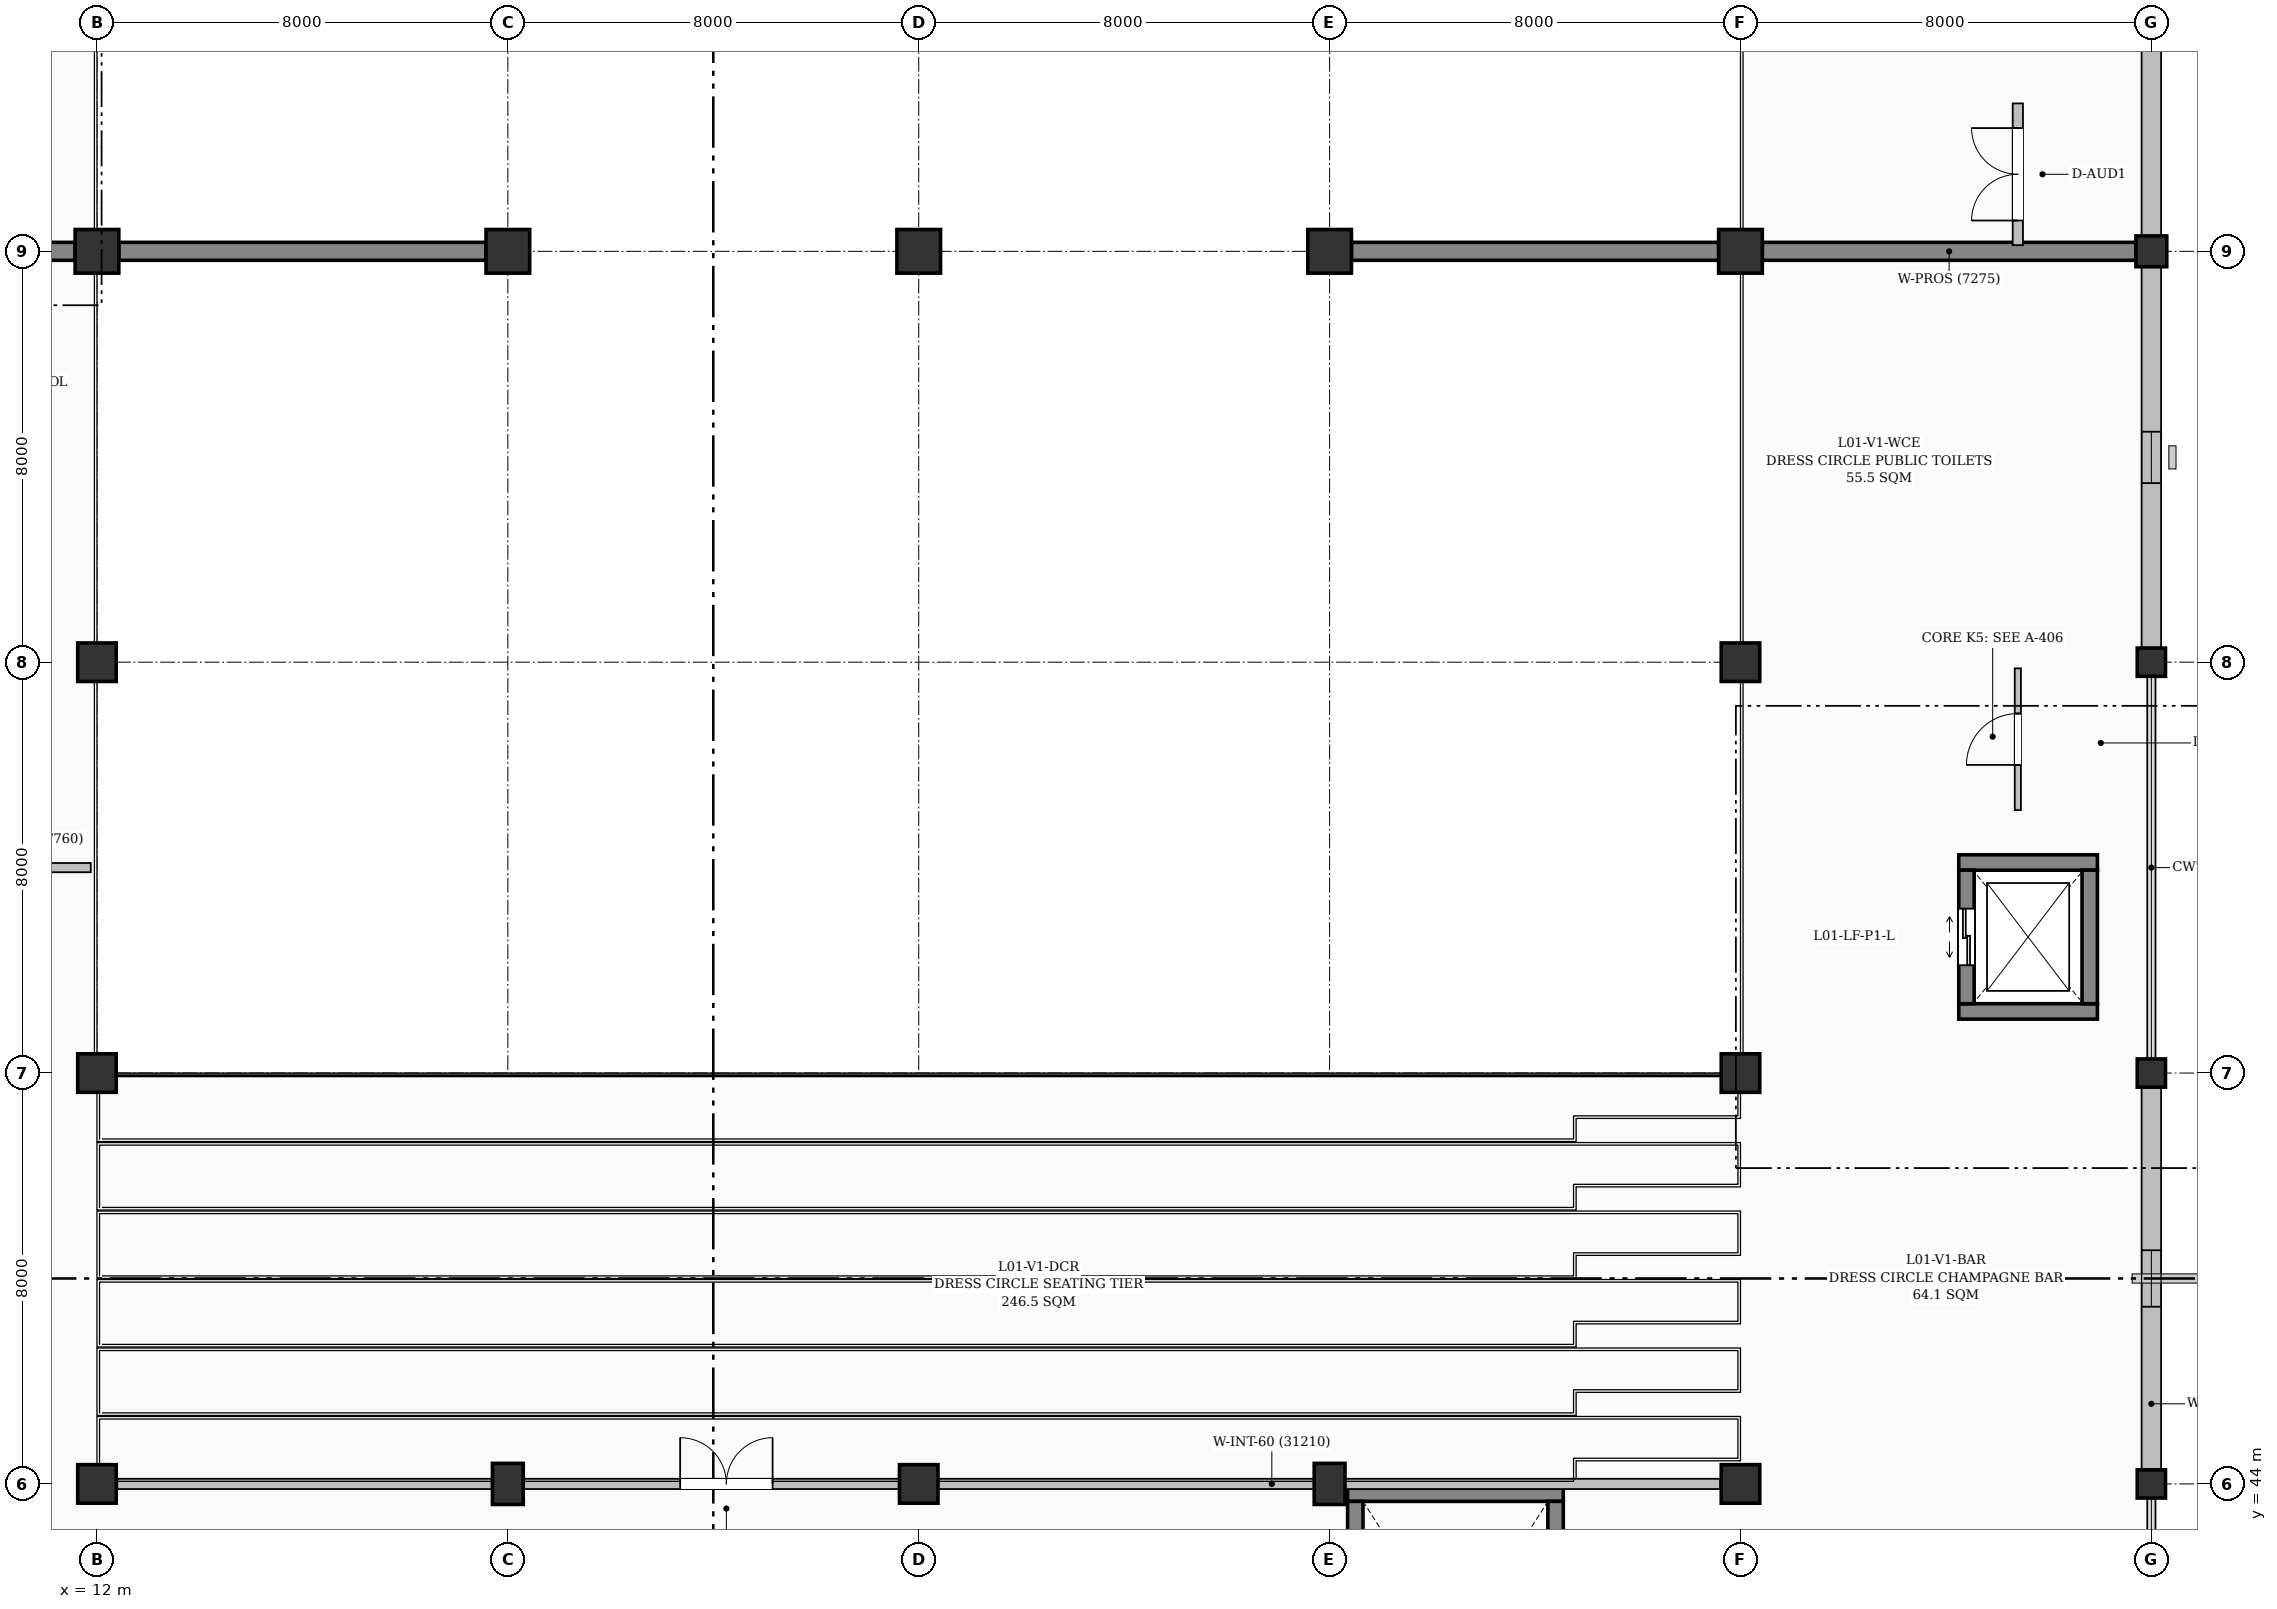
"""IFC4 building model, lengths in metres.
Left out: names, types, materials, properties, quantities, classifications, styles, units other than length and angle.
Written with IfcOpenShell. Run it as: python <this file> out.ifc"""

import sys

from ifc_helpers import new_model, si_unit, direction, frame, frame_2d, origin, origin_2d, place, context, subcontext, project, spatial, rectangle, extrude, element, fill, save


model = new_model("IFC4")
c1 = context("Model", 3, precision=1e-05, world=origin(), true_north=direction((0.0, 1.0)))
c2 = subcontext(c1, "Body", "Model", "MODEL_VIEW")
j1 = project(units=[si_unit("LENGTHUNIT", "METRE"), si_unit("PLANEANGLEUNIT", "RADIAN")], contexts=[c1])
p1 = place(None, origin())
s1 = spatial("IfcSite", under=j1, at=p1, CompositionType="ELEMENT")
p2 = place(p1, origin())
s2 = spatial("IfcBuilding", under=s1, at=p2, CompositionType="ELEMENT")
p3 = place(p2, frame((0.0, 0.0, 4.8)))
s3 = spatial("IfcBuildingStorey", under=s2, at=p3, CompositionType="ELEMENT", Elevation=4.8)
for number, where, z_axis, x_axis in (
    (1, (12.0, 44.0, 0.0), (0.0, 0.0, 1.0), (1.0, 0.0, 0.0)),
    (2, (12.0, 52.0, 0.0), (0.0, 0.0, 1.0), (1.0, 0.0, 0.0)),
    (3, (12.0, 60.0, 0.0), (0.0, 0.0, 1.0), (1.0, 0.0, 0.0)),
):
    element("IfcColumn", number, at=place(p3, frame(where, z_axis=z_axis, x_axis=x_axis)), inside=s3, PredefinedType="COLUMN", context=c2, shape_type="SweptSolid", body=[
        extrude(rectangle(XDim=0.75, YDim=0.75, at=origin_2d()), origin(), (0.0, 0.0, 1.0), 4.5),
    ])
p4 = place(p3, frame((12.0, 68.0, 0.0), z_axis=(0.0, 0.0, 1.0), x_axis=(1.0, 0.0, 0.0)))
e4 = element("IfcColumn", 4, at=p4, inside=s3, PredefinedType="COLUMN", context=c2, shape_type="SweptSolid", body=[
    extrude(rectangle(XDim=0.85, YDim=0.85, at=origin_2d()), origin(), (0.0, 0.0, 1.0), 4.5),
])
p5 = place(p3, frame((20.0, 44.0, 0.0), z_axis=(0.0, 0.0, 1.0), x_axis=(1.0, 0.0, 0.0)))
e5 = element("IfcColumn", 5, at=p5, inside=s3, PredefinedType="COLUMN", context=c2, shape_type="SweptSolid", body=[
    extrude(rectangle(XDim=0.6, YDim=0.8, at=origin_2d()), origin(), (0.0, 0.0, 1.0), 4.5),
])
p6 = place(p3, frame((20.0, 68.0, 0.0), z_axis=(0.0, 0.0, 1.0), x_axis=(1.0, 0.0, 0.0)))
e6 = element("IfcColumn", 6, at=p6, inside=s3, PredefinedType="COLUMN", context=c2, shape_type="SweptSolid", body=[
    extrude(rectangle(XDim=0.85, YDim=0.85, at=origin_2d()), origin(), (0.0, 0.0, 1.0), 4.5),
])
p7 = place(p3, frame((28.0, 44.0, 0.0), z_axis=(0.0, 0.0, 1.0), x_axis=(1.0, 0.0, 0.0)))
e7 = element("IfcColumn", 7, at=p7, inside=s3, PredefinedType="COLUMN", context=c2, shape_type="SweptSolid", body=[
    extrude(rectangle(XDim=0.75, YDim=0.75, at=origin_2d()), origin(), (0.0, 0.0, 1.0), 4.5),
])
p8 = place(p3, frame((28.0, 68.0, 0.0), z_axis=(0.0, 0.0, 1.0), x_axis=(1.0, 0.0, 0.0)))
e8 = element("IfcColumn", 8, at=p8, inside=s3, PredefinedType="COLUMN", context=c2, shape_type="SweptSolid", body=[
    extrude(rectangle(XDim=0.85, YDim=0.85, at=origin_2d()), origin(), (0.0, 0.0, 1.0), 4.5),
])
p9 = place(p3, frame((36.0, 44.0, 0.0), z_axis=(0.0, 0.0, 1.0), x_axis=(1.0, 0.0, 0.0)))
e9 = element("IfcColumn", 9, at=p9, inside=s3, PredefinedType="COLUMN", context=c2, shape_type="SweptSolid", body=[
    extrude(rectangle(XDim=0.6, YDim=0.8, at=origin_2d()), origin(), (0.0, 0.0, 1.0), 4.5),
])
p10 = place(p3, frame((36.0, 68.0, 0.0), z_axis=(0.0, 0.0, 1.0), x_axis=(1.0, 0.0, 0.0)))
e10 = element("IfcColumn", 10, at=p10, inside=s3, PredefinedType="COLUMN", context=c2, shape_type="SweptSolid", body=[
    extrude(rectangle(XDim=0.85, YDim=0.85, at=origin_2d()), origin(), (0.0, 0.0, 1.0), 4.5),
])
for number, where, z_axis, x_axis in (
    (11, (44.0, 44.0, 0.0), (0.0, 0.0, 1.0), (1.0, 0.0, 0.0)),
    (12, (44.0, 52.0, 0.0), (0.0, 0.0, 1.0), (1.0, 0.0, 0.0)),
    (13, (44.0, 60.0, 0.0), (0.0, 0.0, 1.0), (1.0, 0.0, 0.0)),
):
    element("IfcColumn", number, at=place(p3, frame(where, z_axis=z_axis, x_axis=x_axis)), inside=s3, PredefinedType="COLUMN", context=c2, shape_type="SweptSolid", body=[
        extrude(rectangle(XDim=0.75, YDim=0.75, at=origin_2d()), origin(), (0.0, 0.0, 1.0), 4.5),
    ])
p11 = place(p3, frame((44.0, 68.0, 0.0), z_axis=(0.0, 0.0, 1.0), x_axis=(1.0, 0.0, 0.0)))
e14 = element("IfcColumn", 14, at=p11, inside=s3, PredefinedType="COLUMN", context=c2, shape_type="SweptSolid", body=[
    extrude(rectangle(XDim=0.85, YDim=0.85, at=origin_2d()), origin(), (0.0, 0.0, 1.0), 4.5),
])
for number, where, z_axis, x_axis in (
    (15, (52.0, 44.0, 0.0), (0.0, 0.0, 1.0), (1.0, 0.0, 0.0)),
    (16, (52.0, 52.0, 0.0), (0.0, 0.0, 1.0), (1.0, 0.0, 0.0)),
    (17, (52.0, 60.0, 0.0), (0.0, 0.0, 1.0), (1.0, 0.0, 0.0)),
):
    element("IfcColumn", number, at=place(p3, frame(where, z_axis=z_axis, x_axis=x_axis)), inside=s3, PredefinedType="COLUMN", context=c2, shape_type="SweptSolid", body=[
        extrude(rectangle(XDim=0.55, YDim=0.55, at=origin_2d()), origin(), (0.0, 0.0, 1.0), 4.5),
    ])
p12 = place(p3, frame((52.0, 68.0, 0.0), z_axis=(0.0, 0.0, 1.0), x_axis=(1.0, 0.0, 0.0)))
e18 = element("IfcColumn", 18, at=p12, inside=s3, PredefinedType="COLUMN", context=c2, shape_type="SweptSolid", body=[
    extrude(rectangle(XDim=0.6, YDim=0.6, at=origin_2d()), origin(), (0.0, 0.0, 1.0), 4.5),
])
p13 = place(p3, frame((4.3, 68.0, 0.0), z_axis=(0.0, 0.0, 1.0), x_axis=(1.0, 0.0, 0.0)))
e19 = element("IfcWall", 19, at=p13, inside=s3, PredefinedType="SHEAR", context=c2, shape_type="SweptSolid", body=[
    extrude(rectangle(XDim=7.275, YDim=0.35, at=frame_2d((3.637, 0.0))), origin(), (0.0, 0.0, 1.0), 4.25),
])
for number, where, z_axis, x_axis in (
    (20, (12.425, 68.0, 0.0), (0.0, 0.0, 1.0), (1.0, 0.0, 0.0)),
    (21, (36.425, 68.0, 0.0), (0.0, 0.0, 1.0), (1.0, 0.0, 0.0)),
):
    element("IfcWall", number, at=place(p3, frame(where, z_axis=z_axis, x_axis=x_axis)), inside=s3, PredefinedType="SHEAR", context=c2, shape_type="SweptSolid", body=[
        extrude(rectangle(XDim=7.15, YDim=0.35, at=frame_2d((3.575, 0.0))), origin(), (0.0, 0.0, 1.0), 4.25),
    ])
p14 = place(p3, frame((44.425, 68.0, 0.0), z_axis=(0.0, 0.0, 1.0), x_axis=(1.0, 0.0, 0.0)))
e22 = element("IfcWall", 22, at=p14, inside=s3, PredefinedType="SHEAR", context=c2, shape_type="SweptSolid", body=[
    extrude(rectangle(XDim=7.275, YDim=0.35, at=frame_2d((3.637, 0.0))), origin(), (0.0, 0.0, 1.0), 4.25),
])
p15 = place(p3, frame((52.0, 67.7, 0.0), z_axis=(0.0, 0.0, 1.0), x_axis=(0.0, -1.0, 0.0)))
e23 = element("IfcWall", 23, at=p15, inside=s3, PredefinedType="SOLIDWALL", context=c2, shape_type="SweptSolid", body=[
    extrude(rectangle(XDim=7.425, YDim=0.38, at=frame_2d((3.712, 0.0))), origin(), (0.0, 0.0, 1.0), 4.25),
])
p16 = place(p15, frame((3.212, 0.0, 0.95)))
e24 = element("IfcOpeningElement", 24, at=p16, cuts=e23, PredefinedType="OPENING", context=c2, shape_type="SweptSolid", body=[
    extrude(rectangle(XDim=1.0, YDim=1.4, at=frame_2d((0.5, 0.7))), frame((0.0, 0.2, 0.0), z_axis=(0.0, -1.0, 0.0), x_axis=(1.0, 0.0, 0.0)), (0.0, 0.0, 1.0), 0.4),
])
p17 = place(p3, frame((52.0, 51.725, 0.0), z_axis=(0.0, 0.0, 1.0), x_axis=(0.0, -1.0, 0.0)))
e25 = element("IfcWall", 25, at=p17, inside=s3, PredefinedType="SOLIDWALL", context=c2, shape_type="SweptSolid", body=[
    extrude(rectangle(XDim=7.45, YDim=0.38, at=frame_2d((3.725, 0.0))), origin(), (0.0, 0.0, 1.0), 4.25),
])
p18 = place(p17, frame((3.175, 0.0, 0.95)))
e26 = element("IfcOpeningElement", 26, at=p18, cuts=e25, PredefinedType="OPENING", context=c2, shape_type="SweptSolid", body=[
    extrude(rectangle(XDim=1.1, YDim=2.0, at=frame_2d((0.55, 1.0))), frame((0.0, 0.2, 0.0), z_axis=(0.0, -1.0, 0.0), x_axis=(1.0, 0.0, 0.0)), (0.0, 0.0, 1.0), 0.4),
])
p19 = place(p3, frame((52.0, 75.7, 0.0), z_axis=(0.0, 0.0, 1.0), x_axis=(0.0, -1.0, 0.0)))
e27 = element("IfcWall", 27, at=p19, inside=s3, PredefinedType="SOLIDWALL", context=c2, shape_type="SweptSolid", body=[
    extrude(rectangle(XDim=7.4, YDim=0.38, at=frame_2d((3.7, 0.0))), origin(), (0.0, 0.0, 1.0), 4.035),
])
p20 = place(p3, frame((40.55, 43.81, 0.0), z_axis=(0.0, 0.0, 1.0), x_axis=(-1.0, 0.0, 0.0)))
e28 = element("IfcWall", 28, at=p20, inside=s3, PredefinedType="SHEAR", context=c2, shape_type="SweptSolid", body=[
    extrude(rectangle(XDim=4.2, YDim=0.3, at=frame_2d((2.1, 0.0))), origin(), (0.0, 0.0, 1.0), 4.25),
])
p21 = place(p3, frame((36.5, 36.34, 0.0), z_axis=(0.0, 0.0, 1.0), x_axis=(0.0, 1.0, 0.0)))
e29 = element("IfcWall", 29, at=p21, inside=s3, PredefinedType="SHEAR", context=c2, shape_type="SweptSolid", body=[
    extrude(rectangle(XDim=7.32, YDim=0.3, at=frame_2d((3.66, 0.0))), origin(), (0.0, 0.0, 1.0), 4.25),
])
p22 = place(p3, frame((40.4, 36.34, 0.0), z_axis=(0.0, 0.0, 1.0), x_axis=(0.0, 1.0, 0.0)))
e30 = element("IfcWall", 30, at=p22, inside=s3, PredefinedType="SHEAR", context=c2, shape_type="SweptSolid", body=[
    extrude(rectangle(XDim=7.32, YDim=0.3, at=frame_2d((3.66, 0.0))), origin(), (0.0, 0.0, 1.0), 4.25),
])
p23 = place(p22, frame((0.35, 0.0, 0.0)))
e31 = element("IfcOpeningElement", 31, at=p23, cuts=e30, PredefinedType="OPENING", context=c2, shape_type="SweptSolid", body=[
    extrude(rectangle(XDim=1.2, YDim=2.15, at=frame_2d((0.6, 1.075))), frame((0.0, 0.16, 0.0), z_axis=(0.0, -1.0, 0.0), x_axis=(1.0, 0.0, 0.0)), (0.0, 0.0, 1.0), 0.32),
])
for number, where, z_axis, x_axis in (
    (32, (48.25, 53.2, 0.0), (0.0, 0.0, 1.0), (1.0, 0.0, 0.0)),
    (33, (50.95, 56.1, 0.0), (0.0, 0.0, 1.0), (-1.0, 0.0, 0.0)),
):
    element("IfcWall", number, at=place(p3, frame(where, z_axis=z_axis, x_axis=x_axis)), inside=s3, PredefinedType="SHEAR", context=c2, shape_type="SweptSolid", body=[
        extrude(rectangle(XDim=2.7, YDim=0.3, at=frame_2d((1.35, 0.0))), origin(), (0.0, 0.0, 1.0), 4.25),
    ])
p24 = place(p3, frame((48.4, 53.35, 0.0), z_axis=(0.0, 0.0, 1.0), x_axis=(0.0, 1.0, 0.0)))
e34 = element("IfcWall", 34, at=p24, inside=s3, PredefinedType="SHEAR", context=c2, shape_type="SweptSolid", body=[
    extrude(rectangle(XDim=2.6, YDim=0.3, at=frame_2d((1.3, 0.0))), origin(), (0.0, 0.0, 1.0), 4.25),
])
p25 = place(p24, frame((0.75, 0.0, 0.0)))
e35 = element("IfcOpeningElement", 35, at=p25, cuts=e34, PredefinedType="OPENING", context=c2, shape_type="SweptSolid", body=[
    extrude(rectangle(XDim=1.1, YDim=2.15, at=frame_2d((0.55, 1.075))), frame((0.0, 0.16, 0.0), z_axis=(0.0, -1.0, 0.0), x_axis=(1.0, 0.0, 0.0)), (0.0, 0.0, 1.0), 0.32),
])
p26 = place(p3, frame((50.8, 55.95, 0.0), z_axis=(0.0, 0.0, 1.0), x_axis=(0.0, -1.0, 0.0)))
e36 = element("IfcWall", 36, at=p26, inside=s3, PredefinedType="SHEAR", context=c2, shape_type="SweptSolid", body=[
    extrude(rectangle(XDim=2.6, YDim=0.3, at=frame_2d((1.3, 0.0))), origin(), (0.0, 0.0, 1.0), 4.25),
])
p27 = place(p3, frame((12.395, 44.0, 0.0), z_axis=(0.0, 0.0, 1.0), x_axis=(1.0, 0.0, 0.0)))
e37 = element("IfcWall", 37, at=p27, inside=s3, PredefinedType="PARTITIONING", context=c2, shape_type="SweptSolid", body=[
    extrude(rectangle(XDim=31.21, YDim=0.2, at=frame_2d((15.605, 0.0))), origin(), (0.0, 0.0, 1.0), 3.385),
])
p28 = place(p27, frame((10.96, 0.0, 0.0)))
e38 = element("IfcOpeningElement", 38, at=p28, cuts=e37, PredefinedType="OPENING", context=c2, shape_type="SweptSolid", body=[
    extrude(rectangle(XDim=1.8, YDim=2.35, at=frame_2d((0.9, 1.175))), frame((0.0, 0.11, 0.0), z_axis=(0.0, -1.0, 0.0), x_axis=(1.0, 0.0, 0.0)), (0.0, 0.0, 1.0), 0.22),
])
p29 = place(p3, frame((4.12, 56.0, 0.0), z_axis=(0.0, 0.0, 1.0), x_axis=(1.0, 0.0, 0.0)))
e39 = element("IfcWall", 39, at=p29, inside=s3, PredefinedType="PARTITIONING", context=c2, shape_type="SweptSolid", body=[
    extrude(rectangle(XDim=7.76, YDim=0.18, at=frame_2d((3.88, 0.0))), origin(), (0.0, 0.0, 1.0), 4.25),
])
p30 = place(p29, frame((3.205, 0.0, 0.0)))
e40 = element("IfcOpeningElement", 40, at=p30, cuts=e39, PredefinedType="OPENING", context=c2, shape_type="SweptSolid", body=[
    extrude(rectangle(XDim=1.35, YDim=2.2, at=frame_2d((0.675, 1.1))), frame((0.0, 0.1, 0.0), z_axis=(0.0, -1.0, 0.0), x_axis=(1.0, 0.0, 0.0)), (0.0, 0.0, 1.0), 0.2),
])
p31 = place(p3, frame((49.4, 57.12, 0.0), z_axis=(0.0, 0.0, 1.0), x_axis=(0.0, 1.0, 0.0)))
e41 = element("IfcWall", 41, at=p31, inside=s3, PredefinedType="PARTITIONING", context=c2, shape_type="SweptSolid", body=[
    extrude(rectangle(XDim=2.76, YDim=0.12, at=frame_2d((1.38, 0.0))), origin(), (0.0, 0.0, 1.0), 4.25),
])
p32 = place(p31, frame((0.88, 0.0, 0.0)))
e42 = element("IfcOpeningElement", 42, at=p32, cuts=e41, PredefinedType="OPENING", context=c2, shape_type="SweptSolid", body=[
    extrude(rectangle(XDim=1.0, YDim=2.1, at=frame_2d((0.5, 1.05))), frame((0.0, 0.07, 0.0), z_axis=(0.0, -1.0, 0.0), x_axis=(1.0, 0.0, 0.0)), (0.0, 0.0, 1.0), 0.14),
])
p33 = place(p3, frame((49.4, 68.12, 0.0), z_axis=(0.0, 0.0, 1.0), x_axis=(0.0, 1.0, 0.0)))
e43 = element("IfcWall", 43, at=p33, inside=s3, PredefinedType="PARTITIONING", context=c2, shape_type="SweptSolid", body=[
    extrude(rectangle(XDim=2.76, YDim=0.2, at=frame_2d((1.38, 0.0))), origin(), (0.0, 0.0, 1.0), 4.25),
])
p34 = place(p33, frame((0.48, 0.0, 0.0)))
e44 = element("IfcOpeningElement", 44, at=p34, cuts=e43, PredefinedType="OPENING", context=c2, shape_type="SweptSolid", body=[
    extrude(rectangle(XDim=1.8, YDim=2.35, at=frame_2d((0.9, 1.175))), frame((0.0, 0.11, 0.0), z_axis=(0.0, -1.0, 0.0), x_axis=(1.0, 0.0, 0.0)), (0.0, 0.0, 1.0), 0.22),
])
p35 = place(p16, origin())
e45 = element("IfcWindow", 45, at=p35, inside=s3, PartitioningType="SINGLE_PANEL", PredefinedType="WINDOW", context=c2, shape_type="SweptSolid", body=[
    extrude(rectangle(XDim=1.0, YDim=1.4, at=frame_2d((0.5, 0.7))), frame((0.0, 0.03, 0.0), z_axis=(0.0, -1.0, 0.0), x_axis=(1.0, 0.0, 0.0)), (0.0, 0.0, 1.0), 0.06),
])
fill(e24, e45)
p36 = place(p18, origin())
e46 = element("IfcWindow", 46, at=p36, inside=s3, PartitioningType="SINGLE_PANEL", PredefinedType="WINDOW", context=c2, shape_type="SweptSolid", body=[
    extrude(rectangle(XDim=1.1, YDim=2.0, at=frame_2d((0.55, 1.0))), frame((0.0, 0.03, 0.0), z_axis=(0.0, -1.0, 0.0), x_axis=(1.0, 0.0, 0.0)), (0.0, 0.0, 1.0), 0.06),
])
fill(e26, e46)
p37 = place(p25, origin())
e47 = element("IfcDoor", 47, at=p37, inside=s3, OperationType="DOUBLE_DOOR_SLIDING", PredefinedType="DOOR", context=c2, shape_type="SweptSolid", body=[
    extrude(rectangle(XDim=1.1, YDim=2.15, at=frame_2d((0.55, 1.075))), frame((0.0, 0.025, 0.0), z_axis=(0.0, -1.0, 0.0), x_axis=(1.0, 0.0, 0.0)), (0.0, 0.0, 1.0), 0.05),
])
fill(e35, e47)
p38 = place(p28, origin())
e48 = element("IfcDoor", 48, at=p38, inside=s3, OperationType="DOUBLE_DOOR_SINGLE_SWING", PredefinedType="DOOR", context=c2, shape_type="SweptSolid", body=[
    extrude(rectangle(XDim=1.8, YDim=2.35, at=frame_2d((0.9, 1.175))), frame((0.0, 0.025, 0.0), z_axis=(0.0, -1.0, 0.0), x_axis=(1.0, 0.0, 0.0)), (0.0, 0.0, 1.0), 0.05),
])
fill(e38, e48)
p39 = place(p32, origin())
e49 = element("IfcDoor", 49, at=p39, inside=s3, OperationType="SINGLE_SWING_LEFT", PredefinedType="DOOR", context=c2, shape_type="SweptSolid", body=[
    extrude(rectangle(XDim=1.0, YDim=2.1, at=frame_2d((0.5, 1.05))), frame((0.0, 0.025, 0.0), z_axis=(0.0, -1.0, 0.0), x_axis=(1.0, 0.0, 0.0)), (0.0, 0.0, 1.0), 0.05),
])
fill(e42, e49)
p40 = place(p34, origin())
e50 = element("IfcDoor", 50, at=p40, inside=s3, OperationType="DOUBLE_DOOR_SINGLE_SWING", PredefinedType="DOOR", context=c2, shape_type="SweptSolid", body=[
    extrude(rectangle(XDim=1.8, YDim=2.35, at=frame_2d((0.9, 1.175))), frame((0.0, 0.025, 0.0), z_axis=(0.0, -1.0, 0.0), x_axis=(1.0, 0.0, 0.0)), (0.0, 0.0, 1.0), 0.05),
])
fill(e44, e50)
save(model, sys.argv[1])
